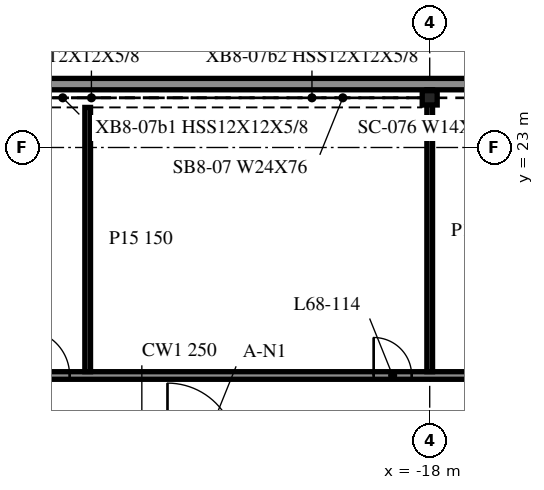
"""IFC4 building model, lengths in metres.
Left out: names, types, materials, properties, quantities, classifications, styles, units other than length and angle.
Written with IfcOpenShell. Run it as: python <this file> out.ifc"""

import sys

from ifc_helpers import new_model, si_unit, direction, frame, frame_2d, origin, origin_2d, place, context, subcontext, project, spatial, rectangle, i_section, extrude, element, fill, save


model = new_model("IFC4")
c1 = context("Model", 3, precision=1e-05, world=origin(), true_north=direction((0.0, 1.0)))
c2 = subcontext(c1, "Body", "Model", "MODEL_VIEW")
j1 = project(units=[si_unit("LENGTHUNIT", "METRE"), si_unit("PLANEANGLEUNIT", "RADIAN")], contexts=[c1])
p1 = place(None, origin())
s1 = spatial("IfcSite", under=j1, at=p1, CompositionType="ELEMENT")
p2 = place(p1, origin())
s2 = spatial("IfcBuilding", under=s1, at=p2, CompositionType="ELEMENT")
p3 = place(p2, frame((0.0, 0.0, 278.5)))
s3 = spatial("IfcBuildingStorey", under=s2, at=p3, CompositionType="ELEMENT", Elevation=278.5)
p4 = place(p3, frame((-18.0, 24.307, -0.34), z_axis=(0.0, 0.0, 1.0), x_axis=(1.0, 0.0, 0.0)))
e1 = element("IfcColumn", 1, at=p4, inside=s3, PredefinedType="COLUMN", context=c2, shape_type="SweptSolid", body=[
    extrude(i_section(OverallWidth=0.394, OverallDepth=0.376, WebThickness=0.017, FlangeThickness=0.028, at=origin_2d()), origin(), (0.0, 0.0, 1.0), 3.8),
])
p5 = place(p3, frame((42.0, 24.668, 0.0), z_axis=(0.0, 0.0, 1.0), x_axis=(-1.0, 0.0, 0.0)))
e2 = element("IfcWall", 2, at=p5, inside=s3, PredefinedType="NOTDEFINED", context=c2, shape_type="SweptSolid", body=[
    extrude(rectangle(XDim=84.0, YDim=0.3, at=frame_2d((42.0, 0.0))), origin(), (0.0, 0.0, 1.0), 2.853),
])
p6 = place(p3, frame((-47.975, 17.0, 0.0), z_axis=(0.0, 0.0, 1.0), x_axis=(1.0, 0.0, 0.0)))
e3 = element("IfcWall", 3, at=p6, inside=s3, PredefinedType="PARTITIONING", context=c2, shape_type="SweptSolid", body=[
    extrude(rectangle(XDim=95.95, YDim=0.2, at=frame_2d((47.975, 0.0))), origin(), (0.0, 0.0, 1.0), 3.46),
])
p7 = place(p6, frame((7.3, 0.0, 0.0)))
e4 = element("IfcOpeningElement", 4, at=p7, cuts=e3, PredefinedType="OPENING", context=c2, shape_type="SweptSolid", body=[
    extrude(rectangle(XDim=1.2, YDim=2.1, at=frame_2d((0.6, 1.05))), frame((0.0, 0.11, 0.0), z_axis=(0.0, -1.0, 0.0), x_axis=(1.0, 0.0, 0.0)), (0.0, 0.0, 1.0), 0.22),
])
p8 = place(p6, frame((13.3, 0.0, 0.0)))
e5 = element("IfcOpeningElement", 5, at=p8, cuts=e3, PredefinedType="OPENING", context=c2, shape_type="SweptSolid", body=[
    extrude(rectangle(XDim=1.2, YDim=2.1, at=frame_2d((0.6, 1.05))), frame((0.0, 0.11, 0.0), z_axis=(0.0, -1.0, 0.0), x_axis=(1.0, 0.0, 0.0)), (0.0, 0.0, 1.0), 0.22),
])
p9 = place(p6, frame((19.3, 0.0, 0.0)))
e6 = element("IfcOpeningElement", 6, at=p9, cuts=e3, PredefinedType="OPENING", context=c2, shape_type="SweptSolid", body=[
    extrude(rectangle(XDim=1.2, YDim=2.1, at=frame_2d((0.6, 1.05))), frame((0.0, 0.11, 0.0), z_axis=(0.0, -1.0, 0.0), x_axis=(1.0, 0.0, 0.0)), (0.0, 0.0, 1.0), 0.22),
])
p10 = place(p6, frame((28.5, 0.0, 0.0)))
e7 = element("IfcOpeningElement", 7, at=p10, cuts=e3, PredefinedType="OPENING", context=c2, shape_type="SweptSolid", body=[
    extrude(rectangle(XDim=1.0, YDim=2.1, at=frame_2d((0.5, 1.05))), frame((0.0, 0.11, 0.0), z_axis=(0.0, -1.0, 0.0), x_axis=(1.0, 0.0, 0.0)), (0.0, 0.0, 1.0), 0.22),
])
p11 = place(p6, frame((31.3, 0.0, 0.0)))
e8 = element("IfcOpeningElement", 8, at=p11, cuts=e3, PredefinedType="OPENING", context=c2, shape_type="SweptSolid", body=[
    extrude(rectangle(XDim=1.2, YDim=2.1, at=frame_2d((0.6, 1.05))), frame((0.0, 0.11, 0.0), z_axis=(0.0, -1.0, 0.0), x_axis=(1.0, 0.0, 0.0)), (0.0, 0.0, 1.0), 0.22),
])
p12 = place(p6, frame((37.5, 0.0, 0.0)))
e9 = element("IfcOpeningElement", 9, at=p12, cuts=e3, PredefinedType="OPENING", context=c2, shape_type="SweptSolid", body=[
    extrude(rectangle(XDim=1.0, YDim=2.1, at=frame_2d((0.5, 1.05))), frame((0.0, 0.11, 0.0), z_axis=(0.0, -1.0, 0.0), x_axis=(1.0, 0.0, 0.0)), (0.0, 0.0, 1.0), 0.22),
])
p13 = place(p6, frame((43.3, 0.0, 0.0)))
e10 = element("IfcOpeningElement", 10, at=p13, cuts=e3, PredefinedType="OPENING", context=c2, shape_type="SweptSolid", body=[
    extrude(rectangle(XDim=1.2, YDim=2.1, at=frame_2d((0.6, 1.05))), frame((0.0, 0.11, 0.0), z_axis=(0.0, -1.0, 0.0), x_axis=(1.0, 0.0, 0.0)), (0.0, 0.0, 1.0), 0.22),
])
p14 = place(p6, frame((47.3, 0.0, 0.0)))
e11 = element("IfcOpeningElement", 11, at=p14, cuts=e3, PredefinedType="OPENING", context=c2, shape_type="SweptSolid", body=[
    extrude(rectangle(XDim=1.2, YDim=2.1, at=frame_2d((0.6, 1.05))), frame((0.0, 0.11, 0.0), z_axis=(0.0, -1.0, 0.0), x_axis=(1.0, 0.0, 0.0)), (0.0, 0.0, 1.0), 0.22),
])
p15 = place(p6, frame((51.1, 0.0, 0.0)))
e12 = element("IfcOpeningElement", 12, at=p15, cuts=e3, PredefinedType="OPENING", context=c2, shape_type="SweptSolid", body=[
    extrude(rectangle(XDim=1.2, YDim=2.1, at=frame_2d((0.6, 1.05))), frame((0.0, 0.11, 0.0), z_axis=(0.0, -1.0, 0.0), x_axis=(1.0, 0.0, 0.0)), (0.0, 0.0, 1.0), 0.22),
])
p16 = place(p6, frame((60.1, 0.0, 0.0)))
e13 = element("IfcOpeningElement", 13, at=p16, cuts=e3, PredefinedType="OPENING", context=c2, shape_type="SweptSolid", body=[
    extrude(rectangle(XDim=1.0, YDim=2.1, at=frame_2d((0.5, 1.05))), frame((0.0, 0.11, 0.0), z_axis=(0.0, -1.0, 0.0), x_axis=(1.0, 0.0, 0.0)), (0.0, 0.0, 1.0), 0.22),
])
p17 = place(p6, frame((63.1, 0.0, 0.0)))
e14 = element("IfcOpeningElement", 14, at=p17, cuts=e3, PredefinedType="OPENING", context=c2, shape_type="SweptSolid", body=[
    extrude(rectangle(XDim=1.2, YDim=2.1, at=frame_2d((0.6, 1.05))), frame((0.0, 0.11, 0.0), z_axis=(0.0, -1.0, 0.0), x_axis=(1.0, 0.0, 0.0)), (0.0, 0.0, 1.0), 0.22),
])
p18 = place(p6, frame((69.1, 0.0, 0.0)))
e15 = element("IfcOpeningElement", 15, at=p18, cuts=e3, PredefinedType="OPENING", context=c2, shape_type="SweptSolid", body=[
    extrude(rectangle(XDim=1.0, YDim=2.1, at=frame_2d((0.5, 1.05))), frame((0.0, 0.11, 0.0), z_axis=(0.0, -1.0, 0.0), x_axis=(1.0, 0.0, 0.0)), (0.0, 0.0, 1.0), 0.22),
])
p19 = place(p6, frame((75.1, 0.0, 0.0)))
e16 = element("IfcOpeningElement", 16, at=p19, cuts=e3, PredefinedType="OPENING", context=c2, shape_type="SweptSolid", body=[
    extrude(rectangle(XDim=1.2, YDim=2.1, at=frame_2d((0.6, 1.05))), frame((0.0, 0.11, 0.0), z_axis=(0.0, -1.0, 0.0), x_axis=(1.0, 0.0, 0.0)), (0.0, 0.0, 1.0), 0.22),
])
p20 = place(p6, frame((81.1, 0.0, 0.0)))
e17 = element("IfcOpeningElement", 17, at=p20, cuts=e3, PredefinedType="OPENING", context=c2, shape_type="SweptSolid", body=[
    extrude(rectangle(XDim=1.2, YDim=2.1, at=frame_2d((0.6, 1.05))), frame((0.0, 0.11, 0.0), z_axis=(0.0, -1.0, 0.0), x_axis=(1.0, 0.0, 0.0)), (0.0, 0.0, 1.0), 0.22),
])
p21 = place(p6, frame((90.1, 0.0, 0.0)))
e18 = element("IfcOpeningElement", 18, at=p21, cuts=e3, PredefinedType="OPENING", context=c2, shape_type="SweptSolid", body=[
    extrude(rectangle(XDim=1.2, YDim=2.1, at=frame_2d((0.6, 1.05))), frame((0.0, 0.11, 0.0), z_axis=(0.0, -1.0, 0.0), x_axis=(1.0, 0.0, 0.0)), (0.0, 0.0, 1.0), 0.22),
])
p22 = place(p3, frame((-27.0, 17.1, 0.0), z_axis=(0.0, 0.0, 1.0), x_axis=(0.0, 1.0, 0.0)))
e19 = element("IfcWall", 19, at=p22, inside=s3, PredefinedType="PARTITIONING", context=c2, shape_type="SweptSolid", body=[
    extrude(rectangle(XDim=6.955, YDim=0.15, at=frame_2d((3.477, 0.0))), origin(), (0.0, 0.0, 1.0), 3.46),
])
p23 = place(p3, frame((-18.0, 17.1, 0.0), z_axis=(0.0, 0.0, 1.0), x_axis=(0.0, 1.0, 0.0)))
e20 = element("IfcWall", 20, at=p23, inside=s3, PredefinedType="PARTITIONING", context=c2, shape_type="SweptSolid", body=[
    extrude(rectangle(XDim=7.418, YDim=0.15, at=frame_2d((3.709, 0.0))), origin(), (0.0, 0.0, 1.0), 3.46),
])
p24 = place(p9, origin())
e21 = element("IfcDoor", 21, at=p24, inside=s3, OperationType="SINGLE_SWING_LEFT", PredefinedType="DOOR", context=c2, shape_type="SweptSolid", body=[
    extrude(rectangle(XDim=1.2, YDim=2.1, at=frame_2d((0.6, 1.05))), frame((0.0, 0.025, 0.0), z_axis=(0.0, -1.0, 0.0), x_axis=(1.0, 0.0, 0.0)), (0.0, 0.0, 1.0), 0.05),
])
fill(e6, e21)
p25 = place(p10, origin())
e22 = element("IfcDoor", 22, at=p25, inside=s3, OperationType="SINGLE_SWING_LEFT", PredefinedType="DOOR", context=c2, shape_type="SweptSolid", body=[
    extrude(rectangle(XDim=1.0, YDim=2.1, at=frame_2d((0.5, 1.05))), frame((0.0, 0.025, 0.0), z_axis=(0.0, -1.0, 0.0), x_axis=(1.0, 0.0, 0.0)), (0.0, 0.0, 1.0), 0.05),
])
fill(e7, e22)
save(model, sys.argv[1])
